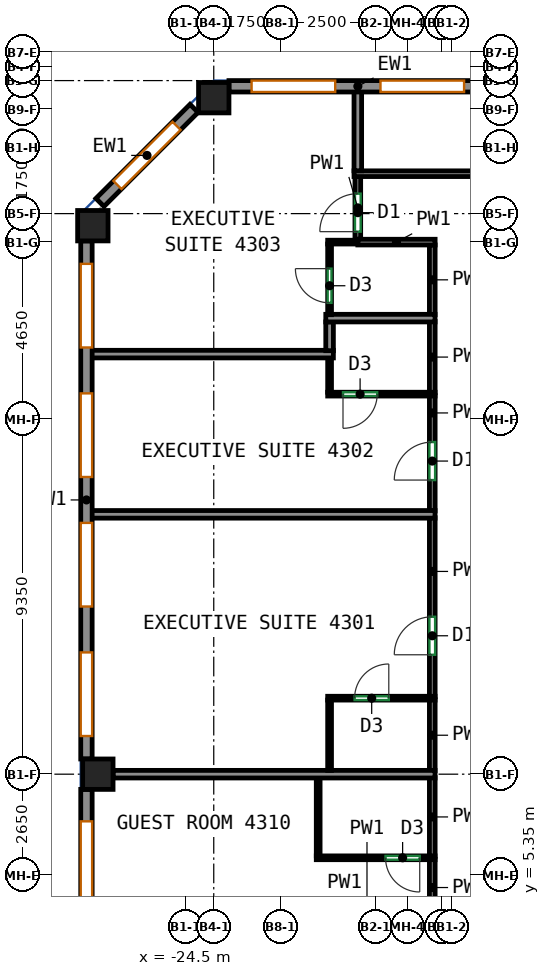
"""IFC4 building model, lengths in metres.
Left out: names, types, materials, properties, quantities, classifications, styles, units other than length and angle.
Written with IfcOpenShell. Run it as: python <this file> out.ifc"""

import sys

from ifc_helpers import new_model, si_unit, direction, frame, frame_2d, origin, origin_2d, place, context, subcontext, project, spatial, rectangle, extrude, source, transform, mapped, element, fill, save


model = new_model("IFC4")
c1 = context("Model", 3, precision=1e-05, world=origin(), true_north=direction((0.0, 1.0)))
c2 = subcontext(c1, "Body", "Model", "MODEL_VIEW")
j1 = project(units=[si_unit("LENGTHUNIT", "METRE"), si_unit("PLANEANGLEUNIT", "RADIAN")], contexts=[c1])
p1 = place(None, origin())
s1 = spatial("IfcSite", under=j1, at=p1, CompositionType="ELEMENT")
p2 = place(p1, origin())
s2 = spatial("IfcBuilding", under=s1, at=p2, CompositionType="ELEMENT")
p3 = place(p2, frame((0.0, 0.0, 182.1)))
s3 = spatial("IfcBuildingStorey", under=s2, at=p3, CompositionType="ELEMENT", Elevation=182.1)
m1 = source(origin(), c2, "Body", "SweptSolid", [
    extrude(rectangle(XDim=0.8, YDim=0.8, at=origin_2d()), origin(), (0.0, 0.0, 1.0), 3.12),
])
for number, where, z_axis, x_axis in (
    (1, (-26.932, 22.432, 0.0), (0.0, 0.0, 1.0), (1.0, 0.0, 0.0)),
    (2, (-26.8, 8.0, 0.0), (0.0, 0.0, 1.0), (1.0, 0.0, 0.0)),
    (3, (-23.75, 25.8, 0.0), (0.0, 0.0, 1.0), (1.0, 0.0, 0.0)),
):
    element("IfcColumn", number, at=place(p3, frame(where, z_axis=z_axis, x_axis=x_axis)), inside=s3, PredefinedType="COLUMN", context=c2, shape_type="MappedRepresentation", body=[
        mapped(m1, transform((0.0, 0.0, 0.0))),
    ])
m2 = source(origin(), c2, "Body", "SweptSolid", [
    extrude(rectangle(XDim=6.783, YDim=0.3, at=frame_2d((3.392, 0.0))), origin(), (0.0, 0.0, 1.0), 3.12),
])
p4 = place(p3, frame((-16.567, 26.1, 0.0), z_axis=(0.0, 0.0, 1.0), x_axis=(-1.0, 0.0, 0.0)))
e4 = element("IfcWall", 4, at=p4, inside=s3, PredefinedType="SOLIDWALL", context=c2, shape_type="MappedRepresentation", body=[
    mapped(m2, transform((0.0, 0.0, 0.0))),
])
p5 = place(p4, frame((0.596, 0.0, 0.85)))
e5 = element("IfcOpeningElement", 5, at=p5, cuts=e4, PredefinedType="OPENING", context=c2, shape_type="SweptSolid", body=[
    extrude(rectangle(XDim=2.2, YDim=1.95, at=frame_2d((1.1, 0.975))), frame((0.0, 0.16, 0.0), z_axis=(0.0, -1.0, 0.0), x_axis=(1.0, 0.0, 0.0)), (0.0, 0.0, 1.0), 0.32),
])
p6 = place(p4, frame((3.988, 0.0, 0.85)))
e6 = element("IfcOpeningElement", 6, at=p6, cuts=e4, PredefinedType="OPENING", context=c2, shape_type="SweptSolid", body=[
    extrude(rectangle(XDim=2.2, YDim=1.95, at=frame_2d((1.1, 0.975))), frame((0.0, 0.16, 0.0), z_axis=(0.0, -1.0, 0.0), x_axis=(1.0, 0.0, 0.0)), (0.0, 0.0, 1.0), 0.32),
])
m3 = source(origin(), c2, "Body", "SweptSolid", [
    extrude(rectangle(XDim=3.5, YDim=0.3, at=frame_2d((1.75, 0.0))), origin(), (0.0, 0.0, 1.0), 3.12),
])
p7 = place(p3, frame((-24.269, 25.519, 0.0), z_axis=(0.0, 0.0, 1.0), x_axis=(-0.707141656123, -0.70707190453, 0.0)))
e7 = element("IfcWall", 7, at=p7, inside=s3, PredefinedType="SOLIDWALL", context=c2, shape_type="MappedRepresentation", body=[
    mapped(m3, transform((0.0, 0.0, 0.0))),
])
p8 = place(p7, frame((0.65, 0.0, 0.85)))
e8 = element("IfcOpeningElement", 8, at=p8, cuts=e7, PredefinedType="OPENING", context=c2, shape_type="SweptSolid", body=[
    extrude(rectangle(XDim=2.2, YDim=1.95, at=frame_2d((1.1, 0.975))), frame((0.0, 0.16, 0.0), z_axis=(0.0, -1.0, 0.0), x_axis=(1.0, 0.0, 0.0)), (0.0, 0.0, 1.0), 0.32),
])
m4 = source(origin(), c2, "Body", "SweptSolid", [
    extrude(rectangle(XDim=13.632, YDim=0.3, at=frame_2d((6.816, 0.0))), origin(), (0.0, 0.0, 1.0), 3.12),
])
p9 = place(p3, frame((-27.1, 22.032, 0.0), z_axis=(0.0, 0.0, 1.0), x_axis=(0.0, -1.0, 0.0)))
e9 = element("IfcWall", 9, at=p9, inside=s3, PredefinedType="SOLIDWALL", context=c2, shape_type="MappedRepresentation", body=[
    mapped(m4, transform((0.0, 0.0, 0.0))),
])
p10 = place(p9, frame((0.604, 0.0, 0.85)))
e10 = element("IfcOpeningElement", 10, at=p10, cuts=e9, PredefinedType="OPENING", context=c2, shape_type="SweptSolid", body=[
    extrude(rectangle(XDim=2.2, YDim=1.95, at=frame_2d((1.1, 0.975))), frame((0.0, 0.16, 0.0), z_axis=(0.0, -1.0, 0.0), x_axis=(1.0, 0.0, 0.0)), (0.0, 0.0, 1.0), 0.32),
])
p11 = place(p9, frame((4.012, 0.0, 0.85)))
e11 = element("IfcOpeningElement", 11, at=p11, cuts=e9, PredefinedType="OPENING", context=c2, shape_type="SweptSolid", body=[
    extrude(rectangle(XDim=2.2, YDim=1.95, at=frame_2d((1.1, 0.975))), frame((0.0, 0.16, 0.0), z_axis=(0.0, -1.0, 0.0), x_axis=(1.0, 0.0, 0.0)), (0.0, 0.0, 1.0), 0.32),
])
p12 = place(p9, frame((7.42, 0.0, 0.85)))
e12 = element("IfcOpeningElement", 12, at=p12, cuts=e9, PredefinedType="OPENING", context=c2, shape_type="SweptSolid", body=[
    extrude(rectangle(XDim=2.2, YDim=1.95, at=frame_2d((1.1, 0.975))), frame((0.0, 0.16, 0.0), z_axis=(0.0, -1.0, 0.0), x_axis=(1.0, 0.0, 0.0)), (0.0, 0.0, 1.0), 0.32),
])
p13 = place(p9, frame((10.828, 0.0, 0.85)))
e13 = element("IfcOpeningElement", 13, at=p13, cuts=e9, PredefinedType="OPENING", context=c2, shape_type="SweptSolid", body=[
    extrude(rectangle(XDim=2.2, YDim=1.95, at=frame_2d((1.1, 0.975))), frame((0.0, 0.16, 0.0), z_axis=(0.0, -1.0, 0.0), x_axis=(1.0, 0.0, 0.0)), (0.0, 0.0, 1.0), 0.32),
])
m5 = source(origin(), c2, "Body", "SweptSolid", [
    extrude(rectangle(XDim=7.763, YDim=0.3, at=frame_2d((3.881, 0.0))), origin(), (0.0, 0.0, 1.0), 3.12),
])
p14 = place(p3, frame((-27.1, 7.6, 0.0), z_axis=(0.0, 0.0, 1.0), x_axis=(0.0, -1.0, 0.0)))
e14 = element("IfcWall", 14, at=p14, inside=s3, PredefinedType="SOLIDWALL", context=c2, shape_type="MappedRepresentation", body=[
    mapped(m5, transform((0.0, 0.0, 0.0))),
])
p15 = place(p14, frame((0.841, 0.0, 0.85)))
e15 = element("IfcOpeningElement", 15, at=p15, cuts=e14, PredefinedType="OPENING", context=c2, shape_type="SweptSolid", body=[
    extrude(rectangle(XDim=2.2, YDim=1.95, at=frame_2d((1.1, 0.975))), frame((0.0, 0.16, 0.0), z_axis=(0.0, -1.0, 0.0), x_axis=(1.0, 0.0, 0.0)), (0.0, 0.0, 1.0), 0.32),
])
p16 = place(p14, frame((4.722, 0.0, 0.85)))
e16 = element("IfcOpeningElement", 16, at=p16, cuts=e14, PredefinedType="OPENING", context=c2, shape_type="SweptSolid", body=[
    extrude(rectangle(XDim=2.2, YDim=1.95, at=frame_2d((1.1, 0.975))), frame((0.0, 0.16, 0.0), z_axis=(0.0, -1.0, 0.0), x_axis=(1.0, 0.0, 0.0)), (0.0, 0.0, 1.0), 0.32),
])
p17 = place(p3, frame((-18.0, 4.275, 0.0), z_axis=(0.0, 0.0, 1.0), x_axis=(0.0, 1.0, 0.0)))
e17 = element("IfcWall", 17, at=p17, inside=s3, PredefinedType="PARTITIONING", context=c2, shape_type="SweptSolid", body=[
    extrude(rectangle(XDim=1.485, YDim=0.15, at=frame_2d((0.743, 0.0))), origin(), (0.0, 0.0, 1.0), 3.12),
])
p18 = place(p3, frame((-18.0, 5.84, 0.0), z_axis=(0.0, 0.0, 1.0), x_axis=(0.0, 1.0, 0.0)))
e18 = element("IfcWall", 18, at=p18, inside=s3, PredefinedType="PARTITIONING", context=c2, shape_type="SweptSolid", body=[
    extrude(rectangle(XDim=2.07, YDim=0.15, at=frame_2d((1.035, 0.0))), origin(), (0.0, 0.0, 1.0), 3.12),
])
p19 = place(p3, frame((-18.0, 10.04, 0.0), z_axis=(0.0, 0.0, 1.0), x_axis=(0.0, 1.0, 0.0)))
e19 = element("IfcWall", 19, at=p19, inside=s3, PredefinedType="PARTITIONING", context=c2, shape_type="SweptSolid", body=[
    extrude(rectangle(XDim=4.707, YDim=0.15, at=frame_2d((2.354, 0.0))), origin(), (0.0, 0.0, 1.0), 3.12),
])
p20 = place(p19, frame((1.102, 0.0, 0.0)))
e20 = element("IfcOpeningElement", 20, at=p20, cuts=e19, PredefinedType="OPENING", context=c2, shape_type="SweptSolid", body=[
    extrude(rectangle(XDim=1.0, YDim=2.1, at=frame_2d((0.5, 1.05))), frame((0.0, 0.085, 0.0), z_axis=(0.0, -1.0, 0.0), x_axis=(1.0, 0.0, 0.0)), (0.0, 0.0, 1.0), 0.17),
])
p21 = place(p3, frame((-18.0, 8.09, 0.0), z_axis=(0.0, 0.0, 1.0), x_axis=(0.0, 1.0, 0.0)))
e21 = element("IfcWall", 21, at=p21, inside=s3, PredefinedType="PARTITIONING", context=c2, shape_type="SweptSolid", body=[
    extrude(rectangle(XDim=1.87, YDim=0.15, at=frame_2d((0.935, 0.0))), origin(), (0.0, 0.0, 1.0), 3.12),
])
p22 = place(p3, frame((-18.0, 14.927, 0.0), z_axis=(0.0, 0.0, 1.0), x_axis=(0.0, 1.0, 0.0)))
e22 = element("IfcWall", 22, at=p22, inside=s3, PredefinedType="PARTITIONING", context=c2, shape_type="SweptSolid", body=[
    extrude(rectangle(XDim=3.033, YDim=0.15, at=frame_2d((1.517, 0.0))), origin(), (0.0, 0.0, 1.0), 3.12),
])
p23 = place(p22, frame((0.812, 0.0, 0.0)))
e23 = element("IfcOpeningElement", 23, at=p23, cuts=e22, PredefinedType="OPENING", context=c2, shape_type="SweptSolid", body=[
    extrude(rectangle(XDim=1.0, YDim=2.1, at=frame_2d((0.5, 1.05))), frame((0.0, 0.085, 0.0), z_axis=(0.0, -1.0, 0.0), x_axis=(1.0, 0.0, 0.0)), (0.0, 0.0, 1.0), 0.17),
])
p24 = place(p3, frame((-18.0, 18.04, 0.0), z_axis=(0.0, 0.0, 1.0), x_axis=(0.0, 1.0, 0.0)))
e24 = element("IfcWall", 24, at=p24, inside=s3, PredefinedType="PARTITIONING", context=c2, shape_type="SweptSolid", body=[
    extrude(rectangle(XDim=1.87, YDim=0.15, at=frame_2d((0.935, 0.0))), origin(), (0.0, 0.0, 1.0), 3.12),
])
p25 = place(p3, frame((-19.959, 22.075, 0.0), z_axis=(0.0, 0.0, 1.0), x_axis=(0.0, 1.0, 0.0)))
e25 = element("IfcWall", 25, at=p25, inside=s3, PredefinedType="PARTITIONING", context=c2, shape_type="SweptSolid", body=[
    extrude(rectangle(XDim=1.65, YDim=0.15, at=frame_2d((0.825, 0.0))), origin(), (0.0, 0.0, 1.0), 3.12),
])
p26 = place(p25, frame((0.2, 0.0, 0.0)))
e26 = element("IfcOpeningElement", 26, at=p26, cuts=e25, PredefinedType="OPENING", context=c2, shape_type="SweptSolid", body=[
    extrude(rectangle(XDim=1.0, YDim=2.1, at=frame_2d((0.5, 1.05))), frame((0.0, 0.085, 0.0), z_axis=(0.0, -1.0, 0.0), x_axis=(1.0, 0.0, 0.0)), (0.0, 0.0, 1.0), 0.17),
])
p27 = place(p3, frame((-18.0, 20.09, 0.0), z_axis=(0.0, 0.0, 1.0), x_axis=(0.0, 1.0, 0.0)))
e27 = element("IfcWall", 27, at=p27, inside=s3, PredefinedType="PARTITIONING", context=c2, shape_type="SweptSolid", body=[
    extrude(rectangle(XDim=1.835, YDim=0.15, at=frame_2d((0.917, 0.0))), origin(), (0.0, 0.0, 1.0), 3.12),
])
p28 = place(p3, frame((-19.959, 22.0, 0.0), z_axis=(0.0, 0.0, 1.0), x_axis=(1.0, 0.0, 0.0)))
e28 = element("IfcWall", 28, at=p28, inside=s3, PredefinedType="PARTITIONING", context=c2, shape_type="SweptSolid", body=[
    extrude(rectangle(XDim=2.034, YDim=0.15, at=frame_2d((1.017, 0.0))), origin(), (0.0, 0.0, 1.0), 3.12),
])
p29 = place(p3, frame((21.85, 23.8, 0.0), z_axis=(0.0, 0.0, 1.0), x_axis=(-1.0, 0.0, 0.0)))
e29 = element("IfcWall", 29, at=p29, inside=s3, PredefinedType="PARTITIONING", context=c2, shape_type="SweptSolid", body=[
    extrude(rectangle(XDim=41.909, YDim=0.15, at=frame_2d((20.955, 0.0))), origin(), (0.0, 0.0, 1.0), 3.12),
])
p30 = place(p29, frame((29.607, 0.0, 0.0)))
e30 = element("IfcOpeningElement", 30, at=p30, cuts=e29, PredefinedType="OPENING", context=c2, shape_type="SweptSolid", body=[
    extrude(rectangle(XDim=1.0, YDim=2.1, at=frame_2d((0.5, 1.05))), frame((0.0, 0.085, 0.0), z_axis=(0.0, -1.0, 0.0), x_axis=(1.0, 0.0, 0.0)), (0.0, 0.0, 1.0), 0.17),
])
p31 = place(p3, frame((-17.927, 5.8, 0.0), z_axis=(0.0, 0.0, 1.0), x_axis=(-1.0, 0.0, 0.0)))
e31 = element("IfcWall", 31, at=p31, inside=s3, PredefinedType="PARTITIONING", context=c2, shape_type="SweptSolid", body=[
    extrude(rectangle(XDim=3.125, YDim=0.1, at=frame_2d((1.562, 0.0))), origin(), (0.0, 0.0, 1.0), 3.12),
])
p32 = place(p31, frame((0.403, 0.0, 0.0)))
e32 = element("IfcOpeningElement", 32, at=p32, cuts=e31, PredefinedType="OPENING", context=c2, shape_type="SweptSolid", body=[
    extrude(rectangle(XDim=0.9, YDim=2.1, at=frame_2d((0.45, 1.05))), frame((0.0, 0.06, 0.0), z_axis=(0.0, -1.0, 0.0), x_axis=(1.0, 0.0, 0.0)), (0.0, 0.0, 1.0), 0.12),
])
p33 = place(p3, frame((-21.002, 5.85, 0.0), z_axis=(0.0, 0.0, 1.0), x_axis=(0.0, 1.0, 0.0)))
e33 = element("IfcWall", 33, at=p33, inside=s3, PredefinedType="PARTITIONING", context=c2, shape_type="SweptSolid", body=[
    extrude(rectangle(XDim=2.05, YDim=0.1, at=frame_2d((1.025, 0.0))), origin(), (0.0, 0.0, 1.0), 3.12),
])
p34 = place(p3, frame((-26.4, 8.0, 0.0), z_axis=(0.0, 0.0, 1.0), x_axis=(1.0, 0.0, 0.0)))
e34 = element("IfcWall", 34, at=p34, inside=s3, PredefinedType="PARTITIONING", context=c2, shape_type="SweptSolid", body=[
    extrude(rectangle(XDim=8.473, YDim=0.2, at=frame_2d((4.236, 0.0))), origin(), (0.0, 0.0, 1.0), 3.12),
])
p35 = place(p3, frame((-20.752, 10.0, 0.0), z_axis=(0.0, 0.0, 1.0), x_axis=(1.0, 0.0, 0.0)))
e35 = element("IfcWall", 35, at=p35, inside=s3, PredefinedType="PARTITIONING", context=c2, shape_type="SweptSolid", body=[
    extrude(rectangle(XDim=2.825, YDim=0.1, at=frame_2d((1.413, 0.0))), origin(), (0.0, 0.0, 1.0), 3.12),
])
p36 = place(p35, frame((0.708, 0.0, 0.0)))
e36 = element("IfcOpeningElement", 36, at=p36, cuts=e35, PredefinedType="OPENING", context=c2, shape_type="SweptSolid", body=[
    extrude(rectangle(XDim=0.9, YDim=2.1, at=frame_2d((0.45, 1.05))), frame((0.0, 0.06, 0.0), z_axis=(0.0, -1.0, 0.0), x_axis=(1.0, 0.0, 0.0)), (0.0, 0.0, 1.0), 0.12),
])
p37 = place(p3, frame((-20.702, 8.1, 0.0), z_axis=(0.0, 0.0, 1.0), x_axis=(0.0, 1.0, 0.0)))
e37 = element("IfcWall", 37, at=p37, inside=s3, PredefinedType="PARTITIONING", context=c2, shape_type="SweptSolid", body=[
    extrude(rectangle(XDim=1.85, YDim=0.1, at=frame_2d((0.925, 0.0))), origin(), (0.0, 0.0, 1.0), 3.12),
])
p38 = place(p3, frame((-17.927, 14.837, 0.0), z_axis=(0.0, 0.0, 1.0), x_axis=(-1.0, 0.0, 0.0)))
e38 = element("IfcWall", 38, at=p38, inside=s3, PredefinedType="PARTITIONING", context=c2, shape_type="SweptSolid", body=[
    extrude(rectangle(XDim=9.073, YDim=0.2, at=frame_2d((4.537, 0.0))), origin(), (0.0, 0.0, 1.0), 3.12),
])
p39 = place(p3, frame((-17.927, 18.0, 0.0), z_axis=(0.0, 0.0, 1.0), x_axis=(-1.0, 0.0, 0.0)))
e39 = element("IfcWall", 39, at=p39, inside=s3, PredefinedType="PARTITIONING", context=c2, shape_type="SweptSolid", body=[
    extrude(rectangle(XDim=2.825, YDim=0.1, at=frame_2d((1.413, 0.0))), origin(), (0.0, 0.0, 1.0), 3.12),
])
p40 = place(p39, frame((1.522, 0.0, 0.0)))
e40 = element("IfcOpeningElement", 40, at=p40, cuts=e39, PredefinedType="OPENING", context=c2, shape_type="SweptSolid", body=[
    extrude(rectangle(XDim=0.9, YDim=2.1, at=frame_2d((0.45, 1.05))), frame((0.0, 0.06, 0.0), z_axis=(0.0, -1.0, 0.0), x_axis=(1.0, 0.0, 0.0)), (0.0, 0.0, 1.0), 0.12),
])
p41 = place(p3, frame((-20.702, 18.05, 0.0), z_axis=(0.0, 0.0, 1.0), x_axis=(0.0, 1.0, 0.0)))
e41 = element("IfcWall", 41, at=p41, inside=s3, PredefinedType="PARTITIONING", context=c2, shape_type="SweptSolid", body=[
    extrude(rectangle(XDim=0.903, YDim=0.1, at=frame_2d((0.451, 0.0))), origin(), (0.0, 0.0, 1.0), 3.12),
])
p42 = place(p3, frame((-20.602, 19.053, 0.0), z_axis=(0.0, 0.0, 1.0), x_axis=(-1.0, 0.0, 0.0)))
e42 = element("IfcWall", 42, at=p42, inside=s3, PredefinedType="PARTITIONING", context=c2, shape_type="SweptSolid", body=[
    extrude(rectangle(XDim=6.398, YDim=0.2, at=frame_2d((3.199, 0.0))), origin(), (0.0, 0.0, 1.0), 3.12),
])
p43 = place(p3, frame((-20.702, 19.9, 0.0), z_axis=(0.0, 0.0, 1.0), x_axis=(0.0, -1.0, 0.0)))
e43 = element("IfcWall", 43, at=p43, inside=s3, PredefinedType="PARTITIONING", context=c2, shape_type="SweptSolid", body=[
    extrude(rectangle(XDim=0.757, YDim=0.2, at=frame_2d((0.378, 0.0))), origin(), (0.0, 0.0, 1.0), 3.12),
])
p44 = place(p3, frame((-17.927, 20.0, 0.0), z_axis=(0.0, 0.0, 1.0), x_axis=(-1.0, 0.0, 0.0)))
e44 = element("IfcWall", 44, at=p44, inside=s3, PredefinedType="PARTITIONING", context=c2, shape_type="SweptSolid", body=[
    extrude(rectangle(XDim=2.875, YDim=0.2, at=frame_2d((1.438, 0.0))), origin(), (0.0, 0.0, 1.0), 3.12),
])
p45 = place(p3, frame((-20.752, 22.0, 0.0), z_axis=(0.0, 0.0, 1.0), x_axis=(1.0, 0.0, 0.0)))
e45 = element("IfcWall", 45, at=p45, inside=s3, PredefinedType="PARTITIONING", context=c2, shape_type="SweptSolid", body=[
    extrude(rectangle(XDim=0.791, YDim=0.1, at=frame_2d((0.396, 0.0))), origin(), (0.0, 0.0, 1.0), 3.12),
])
p46 = place(p3, frame((-20.702, 20.09, 0.0), z_axis=(0.0, 0.0, 1.0), x_axis=(0.0, 1.0, 0.0)))
e46 = element("IfcWall", 46, at=p46, inside=s3, PredefinedType="PARTITIONING", context=c2, shape_type="SweptSolid", body=[
    extrude(rectangle(XDim=1.86, YDim=0.1, at=frame_2d((0.93, 0.0))), origin(), (0.0, 0.0, 1.0), 3.12),
])
p47 = place(p46, frame((0.312, 0.0, 0.0)))
e47 = element("IfcOpeningElement", 47, at=p47, cuts=e46, PredefinedType="OPENING", context=c2, shape_type="SweptSolid", body=[
    extrude(rectangle(XDim=0.9, YDim=2.1, at=frame_2d((0.45, 1.05))), frame((0.0, 0.06, 0.0), z_axis=(0.0, -1.0, 0.0), x_axis=(1.0, 0.0, 0.0)), (0.0, 0.0, 1.0), 0.12),
])
p48 = place(p3, frame((-19.959, 23.877, 0.0), z_axis=(0.0, 0.0, 1.0), x_axis=(0.0, 1.0, 0.0)))
e48 = element("IfcWall", 48, at=p48, inside=s3, PredefinedType="PARTITIONING", context=c2, shape_type="SweptSolid", body=[
    extrude(rectangle(XDim=2.123, YDim=0.2, at=frame_2d((1.062, 0.0))), origin(), (0.0, 0.0, 1.0), 3.12),
])
p49 = place(p5, origin())
e49 = element("IfcWindow", 49, at=p49, inside=s3, PartitioningType="SINGLE_PANEL", PredefinedType="WINDOW", context=c2, shape_type="SweptSolid", body=[
    extrude(rectangle(XDim=2.2, YDim=1.95, at=frame_2d((1.1, 0.975))), frame((0.0, 0.03, 0.0), z_axis=(0.0, -1.0, 0.0), x_axis=(1.0, 0.0, 0.0)), (0.0, 0.0, 1.0), 0.06),
])
fill(e5, e49)
p50 = place(p6, origin())
e50 = element("IfcWindow", 50, at=p50, inside=s3, PartitioningType="SINGLE_PANEL", PredefinedType="WINDOW", context=c2, shape_type="SweptSolid", body=[
    extrude(rectangle(XDim=2.2, YDim=1.95, at=frame_2d((1.1, 0.975))), frame((0.0, 0.03, 0.0), z_axis=(0.0, -1.0, 0.0), x_axis=(1.0, 0.0, 0.0)), (0.0, 0.0, 1.0), 0.06),
])
fill(e6, e50)
p51 = place(p8, origin())
e51 = element("IfcWindow", 51, at=p51, inside=s3, PartitioningType="SINGLE_PANEL", PredefinedType="WINDOW", context=c2, shape_type="SweptSolid", body=[
    extrude(rectangle(XDim=2.2, YDim=1.95, at=frame_2d((1.1, 0.975))), frame((0.0, 0.03, 0.0), z_axis=(0.0, -1.0, 0.0), x_axis=(1.0, 0.0, 0.0)), (0.0, 0.0, 1.0), 0.06),
])
fill(e8, e51)
p52 = place(p10, origin())
e52 = element("IfcWindow", 52, at=p52, inside=s3, PartitioningType="SINGLE_PANEL", PredefinedType="WINDOW", context=c2, shape_type="SweptSolid", body=[
    extrude(rectangle(XDim=2.2, YDim=1.95, at=frame_2d((1.1, 0.975))), frame((0.0, 0.03, 0.0), z_axis=(0.0, -1.0, 0.0), x_axis=(1.0, 0.0, 0.0)), (0.0, 0.0, 1.0), 0.06),
])
fill(e10, e52)
p53 = place(p11, origin())
e53 = element("IfcWindow", 53, at=p53, inside=s3, PartitioningType="SINGLE_PANEL", PredefinedType="WINDOW", context=c2, shape_type="SweptSolid", body=[
    extrude(rectangle(XDim=2.2, YDim=1.95, at=frame_2d((1.1, 0.975))), frame((0.0, 0.03, 0.0), z_axis=(0.0, -1.0, 0.0), x_axis=(1.0, 0.0, 0.0)), (0.0, 0.0, 1.0), 0.06),
])
fill(e11, e53)
p54 = place(p12, origin())
e54 = element("IfcWindow", 54, at=p54, inside=s3, PartitioningType="SINGLE_PANEL", PredefinedType="WINDOW", context=c2, shape_type="SweptSolid", body=[
    extrude(rectangle(XDim=2.2, YDim=1.95, at=frame_2d((1.1, 0.975))), frame((0.0, 0.03, 0.0), z_axis=(0.0, -1.0, 0.0), x_axis=(1.0, 0.0, 0.0)), (0.0, 0.0, 1.0), 0.06),
])
fill(e12, e54)
p55 = place(p13, origin())
e55 = element("IfcWindow", 55, at=p55, inside=s3, PartitioningType="SINGLE_PANEL", PredefinedType="WINDOW", context=c2, shape_type="SweptSolid", body=[
    extrude(rectangle(XDim=2.2, YDim=1.95, at=frame_2d((1.1, 0.975))), frame((0.0, 0.03, 0.0), z_axis=(0.0, -1.0, 0.0), x_axis=(1.0, 0.0, 0.0)), (0.0, 0.0, 1.0), 0.06),
])
fill(e13, e55)
p56 = place(p15, origin())
e56 = element("IfcWindow", 56, at=p56, inside=s3, PartitioningType="SINGLE_PANEL", PredefinedType="WINDOW", context=c2, shape_type="SweptSolid", body=[
    extrude(rectangle(XDim=2.2, YDim=1.95, at=frame_2d((1.1, 0.975))), frame((0.0, 0.03, 0.0), z_axis=(0.0, -1.0, 0.0), x_axis=(1.0, 0.0, 0.0)), (0.0, 0.0, 1.0), 0.06),
])
fill(e15, e56)
p57 = place(p32, origin())
e57 = element("IfcDoor", 57, at=p57, inside=s3, OperationType="SINGLE_SWING_LEFT", PredefinedType="DOOR", context=c2, shape_type="SweptSolid", body=[
    extrude(rectangle(XDim=0.9, YDim=2.1, at=frame_2d((0.45, 1.05))), frame((0.0, 0.025, 0.0), z_axis=(0.0, -1.0, 0.0), x_axis=(1.0, 0.0, 0.0)), (0.0, 0.0, 1.0), 0.05),
])
fill(e32, e57)
p58 = place(p36, origin())
e58 = element("IfcDoor", 58, at=p58, inside=s3, OperationType="SINGLE_SWING_RIGHT", PredefinedType="DOOR", context=c2, shape_type="SweptSolid", body=[
    extrude(rectangle(XDim=0.9, YDim=2.1, at=frame_2d((0.45, 1.05))), frame((0.0, 0.025, 0.0), z_axis=(0.0, -1.0, 0.0), x_axis=(1.0, 0.0, 0.0)), (0.0, 0.0, 1.0), 0.05),
])
fill(e36, e58)
p59 = place(p20, origin())
e59 = element("IfcDoor", 59, at=p59, inside=s3, OperationType="SINGLE_SWING_LEFT", PredefinedType="DOOR", context=c2, shape_type="SweptSolid", body=[
    extrude(rectangle(XDim=1.0, YDim=2.1, at=frame_2d((0.5, 1.05))), frame((0.0, 0.025, 0.0), z_axis=(0.0, -1.0, 0.0), x_axis=(1.0, 0.0, 0.0)), (0.0, 0.0, 1.0), 0.05),
])
fill(e20, e59)
p60 = place(p23, origin())
e60 = element("IfcDoor", 60, at=p60, inside=s3, OperationType="SINGLE_SWING_LEFT", PredefinedType="DOOR", context=c2, shape_type="SweptSolid", body=[
    extrude(rectangle(XDim=1.0, YDim=2.1, at=frame_2d((0.5, 1.05))), frame((0.0, 0.025, 0.0), z_axis=(0.0, -1.0, 0.0), x_axis=(1.0, 0.0, 0.0)), (0.0, 0.0, 1.0), 0.05),
])
fill(e23, e60)
p61 = place(p40, origin())
e61 = element("IfcDoor", 61, at=p61, inside=s3, OperationType="SINGLE_SWING_RIGHT", PredefinedType="DOOR", context=c2, shape_type="SweptSolid", body=[
    extrude(rectangle(XDim=0.9, YDim=2.1, at=frame_2d((0.45, 1.05))), frame((0.0, 0.025, 0.0), z_axis=(0.0, -1.0, 0.0), x_axis=(1.0, 0.0, 0.0)), (0.0, 0.0, 1.0), 0.05),
])
fill(e40, e61)
p62 = place(p47, origin())
e62 = element("IfcDoor", 62, at=p62, inside=s3, OperationType="SINGLE_SWING_RIGHT", PredefinedType="DOOR", context=c2, shape_type="SweptSolid", body=[
    extrude(rectangle(XDim=0.9, YDim=2.1, at=frame_2d((0.45, 1.05))), frame((0.0, 0.025, 0.0), z_axis=(0.0, -1.0, 0.0), x_axis=(1.0, 0.0, 0.0)), (0.0, 0.0, 1.0), 0.05),
])
fill(e47, e62)
p63 = place(p26, origin())
e63 = element("IfcDoor", 63, at=p63, inside=s3, OperationType="SINGLE_SWING_LEFT", PredefinedType="DOOR", context=c2, shape_type="SweptSolid", body=[
    extrude(rectangle(XDim=1.0, YDim=2.1, at=frame_2d((0.5, 1.05))), frame((0.0, 0.025, 0.0), z_axis=(0.0, -1.0, 0.0), x_axis=(1.0, 0.0, 0.0)), (0.0, 0.0, 1.0), 0.05),
])
fill(e26, e63)
save(model, sys.argv[1])
